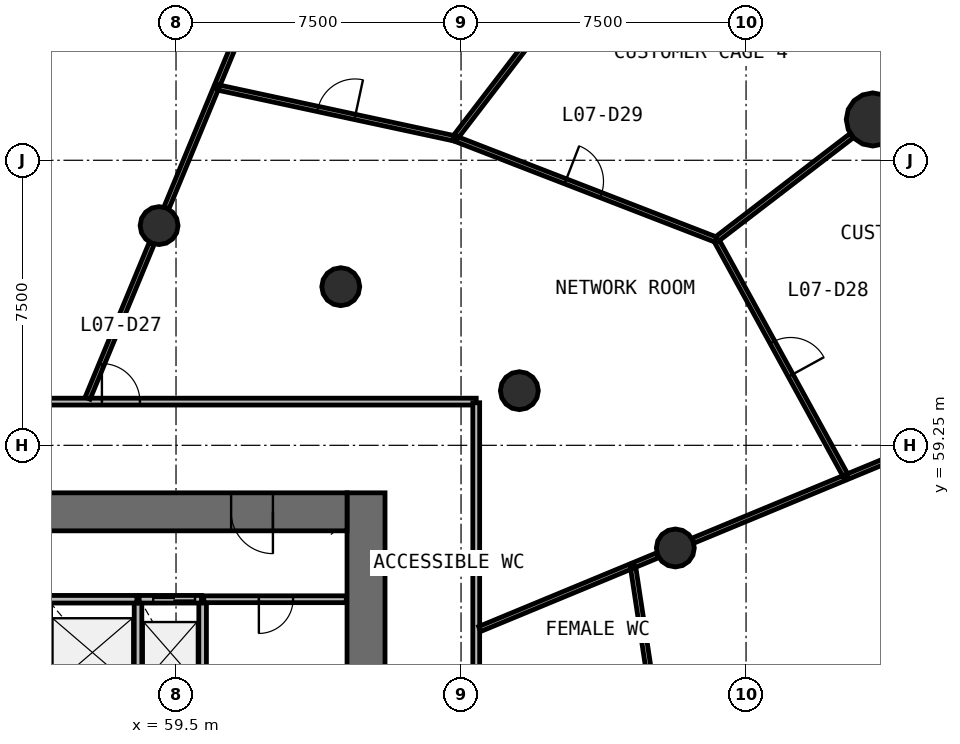
"""IFC4 building model, lengths in metres.
Left out: names, types, materials, properties, quantities, classifications, styles, units other than length and angle.
Written with IfcOpenShell. Run it as: python <this file> out.ifc"""

import sys

from ifc_helpers import new_model, si_unit, direction, frame, frame_2d, origin, origin_2d, place, context, subcontext, project, spatial, rectangle, circle, extrude, source, transform, mapped, element, fill, save


model = new_model("IFC4")
c1 = context("Model", 3, precision=1e-05, world=origin(), true_north=direction((0.0, 1.0)))
c2 = subcontext(c1, "Body", "Model", "MODEL_VIEW")
j1 = project(units=[si_unit("LENGTHUNIT", "METRE"), si_unit("PLANEANGLEUNIT", "RADIAN")], contexts=[c1])
p1 = place(None, origin())
s1 = spatial("IfcSite", under=j1, at=p1, CompositionType="ELEMENT")
p2 = place(p1, origin())
s2 = spatial("IfcBuilding", under=s1, at=p2, CompositionType="ELEMENT")
p3 = place(p2, frame((0.0, 0.0, 31.4)))
s3 = spatial("IfcBuildingStorey", under=s2, at=p3, CompositionType="ELEMENT", Elevation=31.4)
p4 = place(p3, frame((64.5, 38.0, 0.0), z_axis=(0.0, 0.0, 1.0), x_axis=(0.0, 1.0, 0.0)))
e1 = element("IfcWall", 1, at=p4, inside=s3, PredefinedType="SHEAR", context=c2, shape_type="SweptSolid", body=[
    extrude(rectangle(XDim=20.0, YDim=1.0, at=frame_2d((10.0, 0.0))), origin(), (0.0, 0.0, 1.0), 4.4),
])
p5 = place(p4, frame((9.1, 0.0, 0.0)))
e2 = element("IfcOpeningElement", 2, at=p5, cuts=e1, PredefinedType="OPENING", context=c2, shape_type="SweptSolid", body=[
    extrude(rectangle(XDim=1.8, YDim=2.1, at=frame_2d((0.9, 1.05))), frame((0.0, 0.51, 0.0), z_axis=(0.0, -1.0, 0.0), x_axis=(1.0, 0.0, 0.0)), (0.0, 0.0, 1.0), 1.02),
])
p6 = place(p3, frame((64.0, 57.5, 0.0), z_axis=(0.0, 0.0, 1.0), x_axis=(-1.0, 0.0, 0.0)))
e3 = element("IfcWall", 3, at=p6, inside=s3, PredefinedType="SHEAR", context=c2, shape_type="SweptSolid", body=[
    extrude(rectangle(XDim=24.0, YDim=1.0, at=frame_2d((12.0, 0.0))), origin(), (0.0, 0.0, 1.0), 4.4),
])
p7 = place(p6, frame((21.45, 0.0, 0.0)))
e4 = element("IfcOpeningElement", 4, at=p7, cuts=e3, PredefinedType="OPENING", context=c2, shape_type="SweptSolid", body=[
    extrude(rectangle(XDim=1.1, YDim=2.1, at=frame_2d((0.55, 1.05))), frame((0.0, 0.51, 0.0), z_axis=(0.0, -1.0, 0.0), x_axis=(1.0, 0.0, 0.0)), (0.0, 0.0, 1.0), 1.02),
])
p8 = place(p6, frame((1.95, 0.0, 0.0)))
e5 = element("IfcOpeningElement", 5, at=p8, cuts=e3, PredefinedType="OPENING", context=c2, shape_type="SweptSolid", body=[
    extrude(rectangle(XDim=1.1, YDim=2.1, at=frame_2d((0.55, 1.05))), frame((0.0, 0.51, 0.0), z_axis=(0.0, -1.0, 0.0), x_axis=(1.0, 0.0, 0.0)), (0.0, 0.0, 1.0), 1.02),
])
m1 = source(origin(), c2, "Body", "SweptSolid", [
    extrude(circle(Radius=0.7, at=origin_2d()), origin(), (0.0, 0.0, 1.0), 4.4),
])
p9 = place(p3, frame((77.836, 67.824, 0.0), z_axis=(0.0, 0.0, 1.0), x_axis=(1.0, 0.0, 0.0)))
e6 = element("IfcColumn", 6, at=p9, inside=s3, PredefinedType="COLUMN", context=c2, shape_type="MappedRepresentation", body=[
    mapped(m1, transform((0.0, 0.0, 0.0), scale=1.0)),
])
m2 = source(origin(), c2, "Body", "SweptSolid", [
    extrude(circle(Radius=0.5, at=origin_2d()), origin(), (0.0, 0.0, 1.0), 4.4),
])
for number, where, z_axis, x_axis in (
    (7, (72.639, 56.549, 0.0), (0.0, 0.0, 1.0), (1.0, 0.0, 0.0)),
    (8, (68.535, 60.688, 0.0), (0.0, 0.0, 1.0), (1.0, 0.0, 0.0)),
    (9, (63.835, 63.424, 0.0), (0.0, 0.0, 1.0), (1.0, 0.0, 0.0)),
    (10, (59.055, 65.031, 0.0), (0.0, 0.0, 1.0), (1.0, 0.0, 0.0)),
):
    element("IfcColumn", number, at=place(p3, frame(where, z_axis=z_axis, x_axis=x_axis)), inside=s3, PredefinedType="COLUMN", context=c2, shape_type="MappedRepresentation", body=[
        mapped(m2, transform((0.0, 0.0, 0.0), scale=1.0)),
    ])
for number, where, z_axis, x_axis in (
    (11, (58.5, 52.4, 0.0), (0.0, 0.0, 1.0), (0.0, 1.0, 0.0)),
    (12, (60.2, 52.4, 0.0), (0.0, 0.0, 1.0), (0.0, 1.0, 0.0)),
):
    element("IfcWall", number, at=place(p3, frame(where, z_axis=z_axis, x_axis=x_axis)), inside=s3, PredefinedType="SOLIDWALL", context=c2, shape_type="SweptSolid", body=[
        extrude(rectangle(XDim=2.8, YDim=0.2, at=frame_2d((1.4, 0.0))), origin(), (0.0, 0.0, 1.0), 3.95),
    ])
p10 = place(p3, frame((58.47, 55.2, 0.0), z_axis=(0.0, 0.0, 1.0), x_axis=(-1.0, 0.0, 0.0)))
e13 = element("IfcWall", 13, at=p10, inside=s3, PredefinedType="SOLIDWALL", context=c2, shape_type="SweptSolid", body=[
    extrude(rectangle(XDim=2.34, YDim=0.2, at=frame_2d((1.17, 0.0))), origin(), (0.0, 0.0, 1.0), 3.95),
])
p11 = place(p3, frame((60.17, 55.2, 0.0), z_axis=(0.0, 0.0, 1.0), x_axis=(-1.0, 0.0, 0.0)))
e14 = element("IfcWall", 14, at=p11, inside=s3, PredefinedType="SOLIDWALL", context=c2, shape_type="SweptSolid", body=[
    extrude(rectangle(XDim=1.64, YDim=0.2, at=frame_2d((0.82, 0.0))), origin(), (0.0, 0.0, 1.0), 3.95),
])
p12 = place(p11, frame((0.17, 0.0, 0.0)))
e15 = element("IfcOpeningElement", 15, at=p12, cuts=e14, PredefinedType="OPENING", context=c2, shape_type="SweptSolid", body=[
    extrude(rectangle(XDim=1.1, YDim=2.1, at=frame_2d((0.55, 1.05))), frame((0.0, 0.11, 0.0), z_axis=(0.0, -1.0, 0.0), x_axis=(1.0, 0.0, 0.0)), (0.0, 0.0, 1.0), 0.22),
])
p13 = place(p3, frame((36.6, 60.4, 0.0), z_axis=(0.0, 0.0, 1.0), x_axis=(1.0, 0.0, 0.0)))
e16 = element("IfcWall", 16, at=p13, inside=s3, PredefinedType="PARTITIONING", context=c2, shape_type="SweptSolid", body=[
    extrude(rectangle(XDim=30.8, YDim=0.18, at=frame_2d((15.4, 0.0))), origin(), (0.0, 0.0, 1.0), 3.05),
])
p14 = place(p13, frame((20.95, 0.0, 0.0)))
e17 = element("IfcOpeningElement", 17, at=p14, cuts=e16, PredefinedType="OPENING", context=c2, shape_type="SweptSolid", body=[
    extrude(rectangle(XDim=1.0, YDim=2.1, at=frame_2d((0.5, 1.05))), frame((0.0, 0.1, 0.0), z_axis=(0.0, -1.0, 0.0), x_axis=(1.0, 0.0, 0.0)), (0.0, 0.0, 1.0), 0.2),
])
p15 = place(p13, frame((14.95, 0.0, 0.0)))
e18 = element("IfcOpeningElement", 18, at=p15, cuts=e16, PredefinedType="OPENING", context=c2, shape_type="SweptSolid", body=[
    extrude(rectangle(XDim=1.0, YDim=2.1, at=frame_2d((0.5, 1.05))), frame((0.0, 0.1, 0.0), z_axis=(0.0, -1.0, 0.0), x_axis=(1.0, 0.0, 0.0)), (0.0, 0.0, 1.0), 0.2),
])
p16 = place(p3, frame((67.4, 60.37, 0.0), z_axis=(0.0, 0.0, 1.0), x_axis=(0.0, -1.0, 0.0)))
e19 = element("IfcWall", 19, at=p16, inside=s3, PredefinedType="PARTITIONING", context=c2, shape_type="SweptSolid", body=[
    extrude(rectangle(XDim=23.583, YDim=0.18, at=frame_2d((11.791, 0.0))), origin(), (0.0, 0.0, 1.0), 3.05),
])
p17 = place(p16, frame((11.833, 0.0, 0.0)))
e20 = element("IfcOpeningElement", 20, at=p17, cuts=e19, PredefinedType="OPENING", context=c2, shape_type="SweptSolid", body=[
    extrude(rectangle(XDim=0.9, YDim=2.1, at=frame_2d((0.45, 1.05))), frame((0.0, 0.1, 0.0), z_axis=(0.0, -1.0, 0.0), x_axis=(1.0, 0.0, 0.0)), (0.0, 0.0, 1.0), 0.2),
])
p18 = place(p16, frame((10.433, 0.0, 0.0)))
e21 = element("IfcOpeningElement", 21, at=p18, cuts=e19, PredefinedType="OPENING", context=c2, shape_type="SweptSolid", body=[
    extrude(rectangle(XDim=0.9, YDim=2.1, at=frame_2d((0.45, 1.05))), frame((0.0, 0.1, 0.0), z_axis=(0.0, -1.0, 0.0), x_axis=(1.0, 0.0, 0.0)), (0.0, 0.0, 1.0), 0.2),
])
p19 = place(p16, frame((7.833, 0.0, 0.0)))
e22 = element("IfcOpeningElement", 22, at=p19, cuts=e19, PredefinedType="OPENING", context=c2, shape_type="SweptSolid", body=[
    extrude(rectangle(XDim=0.9, YDim=2.1, at=frame_2d((0.45, 1.05))), frame((0.0, 0.1, 0.0), z_axis=(0.0, -1.0, 0.0), x_axis=(1.0, 0.0, 0.0)), (0.0, 0.0, 1.0), 0.2),
])
p20 = place(p16, frame((14.732, 0.0, 0.0)))
e23 = element("IfcOpeningElement", 23, at=p20, cuts=e19, PredefinedType="OPENING", context=c2, shape_type="SweptSolid", body=[
    extrude(rectangle(XDim=1.0, YDim=2.1, at=frame_2d((0.5, 1.05))), frame((0.0, 0.1, 0.0), z_axis=(0.0, -1.0, 0.0), x_axis=(1.0, 0.0, 0.0)), (0.0, 0.0, 1.0), 0.2),
])
p21 = place(p3, frame((63.98, 55.2, 0.0), z_axis=(0.0, 0.0, 1.0), x_axis=(-1.0, 0.0, 0.0)))
e24 = element("IfcWall", 24, at=p21, inside=s3, PredefinedType="PARTITIONING", context=c2, shape_type="SweptSolid", body=[
    extrude(rectangle(XDim=3.75, YDim=0.18, at=frame_2d((1.875, 0.0))), origin(), (0.0, 0.0, 1.0), 3.95),
])
p22 = place(p21, frame((1.4, 0.0, 0.0)))
e25 = element("IfcOpeningElement", 25, at=p22, cuts=e24, PredefinedType="OPENING", context=c2, shape_type="SweptSolid", body=[
    extrude(rectangle(XDim=0.9, YDim=2.1, at=frame_2d((0.45, 1.05))), frame((0.0, 0.1, 0.0), z_axis=(0.0, -1.0, 0.0), x_axis=(1.0, 0.0, 0.0)), (0.0, 0.0, 1.0), 0.2),
])
p23 = place(p3, frame((66.829, 67.326, 0.0), z_axis=(0.0, 0.0, 1.0), x_axis=(0.932497314738, -0.361176906801, 0.0)))
e26 = element("IfcWall", 26, at=p23, inside=s3, PredefinedType="PARTITIONING", context=c2, shape_type="SweptSolid", body=[
    extrude(rectangle(XDim=7.381, YDim=0.14, at=frame_2d((3.69, 0.0))), origin(), (0.0, 0.0, 1.0), 3.05),
])
p24 = place(p23, frame((3.131, 0.0, 0.0)))
e27 = element("IfcOpeningElement", 27, at=p24, cuts=e26, PredefinedType="OPENING", context=c2, shape_type="SweptSolid", body=[
    extrude(rectangle(XDim=1.0, YDim=2.1, at=frame_2d((0.5, 1.05))), frame((0.0, 0.08, 0.0), z_axis=(0.0, -1.0, 0.0), x_axis=(1.0, 0.0, 0.0)), (0.0, 0.0, 1.0), 0.16),
])
p25 = place(p3, frame((73.726, 64.634, 0.0), z_axis=(0.0, 0.0, 1.0), x_axis=(0.481181569965, -0.876620953848, 0.0)))
e28 = element("IfcWall", 28, at=p25, inside=s3, PredefinedType="PARTITIONING", context=c2, shape_type="SweptSolid", body=[
    extrude(rectangle(XDim=7.096, YDim=0.14, at=frame_2d((3.548, 0.0))), origin(), (0.0, 0.0, 1.0), 3.05),
])
p26 = place(p25, frame((3.046, 0.0, 0.0)))
e29 = element("IfcOpeningElement", 29, at=p26, cuts=e28, PredefinedType="OPENING", context=c2, shape_type="SweptSolid", body=[
    extrude(rectangle(XDim=1.0, YDim=2.1, at=frame_2d((0.5, 1.05))), frame((0.0, 0.08, 0.0), z_axis=(0.0, -1.0, 0.0), x_axis=(1.0, 0.0, 0.0)), (0.0, 0.0, 1.0), 0.16),
])
p27 = place(p3, frame((77.168, 58.425, 0.0), z_axis=(0.0, 0.0, 1.0), x_axis=(0.923883429162, 0.382674024883, 0.0)))
e30 = element("IfcWall", 30, at=p27, inside=s3, PredefinedType="PARTITIONING", context=c2, shape_type="SweptSolid", body=[
    extrude(rectangle(XDim=6.959, YDim=0.14, at=frame_2d((3.479, 0.0))), origin(), (0.0, 0.0, 1.0), 3.05),
])
p28 = place(p3, frame((60.563, 68.674, 0.0), z_axis=(0.0, 0.0, 1.0), x_axis=(0.977621151311, -0.210373202926, 0.0)))
e31 = element("IfcWall", 31, at=p28, inside=s3, PredefinedType="PARTITIONING", context=c2, shape_type="SweptSolid", body=[
    extrude(rectangle(XDim=6.379, YDim=0.14, at=frame_2d((3.19, 0.0))), origin(), (0.0, 0.0, 1.0), 3.05),
])
p29 = place(p28, frame((2.729, 0.0, 0.0)))
e32 = element("IfcOpeningElement", 32, at=p29, cuts=e31, PredefinedType="OPENING", context=c2, shape_type="SweptSolid", body=[
    extrude(rectangle(XDim=1.0, YDim=2.1, at=frame_2d((0.5, 1.05))), frame((0.0, 0.08, 0.0), z_axis=(0.0, -1.0, 0.0), x_axis=(1.0, 0.0, 0.0)), (0.0, 0.0, 1.0), 0.16),
])
p30 = place(p3, frame((60.591, 68.74, 0.0), z_axis=(0.0, 0.0, 1.0), x_axis=(0.382657084758, 0.923890445607, 0.0)))
e33 = element("IfcWall", 33, at=p30, inside=s3, PredefinedType="PARTITIONING", context=c2, shape_type="SweptSolid", body=[
    extrude(rectangle(XDim=5.65, YDim=0.14, at=frame_2d((2.825, 0.0))), origin(), (0.0, 0.0, 1.0), 3.05),
])
p31 = place(p3, frame((72.341, 50.678, 0.0), z_axis=(0.0, 0.0, 1.0), x_axis=(-0.149839757117, 0.988710294873, 0.0)))
e34 = element("IfcWall", 34, at=p31, inside=s3, PredefinedType="PARTITIONING", context=c2, shape_type="SweptSolid", body=[
    extrude(rectangle(XDim=5.47, YDim=0.14, at=frame_2d((2.735, 0.0))), origin(), (0.0, 0.0, 1.0), 3.05),
])
p32 = place(p3, frame((66.874, 67.384, 0.0), z_axis=(0.0, 0.0, 1.0), x_axis=(0.608760140139, 0.793354329274, 0.0)))
e35 = element("IfcWall", 35, at=p32, inside=s3, PredefinedType="PARTITIONING", context=c2, shape_type="SweptSolid", body=[
    extrude(rectangle(XDim=5.24, YDim=0.14, at=frame_2d((2.62, 0.0))), origin(), (0.0, 0.0, 1.0), 3.05),
])
p33 = place(p3, frame((57.174, 60.49, 0.0), z_axis=(0.0, 0.0, 1.0), x_axis=(0.382672831764, 0.923883923353, 0.0)))
e36 = element("IfcWall", 36, at=p33, inside=s3, PredefinedType="PARTITIONING", context=c2, shape_type="SweptSolid", body=[
    extrude(rectangle(XDim=4.41, YDim=0.14, at=frame_2d((2.205, 0.0))), origin(), (0.0, 0.0, 1.0), 3.05),
])
p34 = place(p3, frame((73.736, 64.678, 0.0), z_axis=(0.0, 0.0, 1.0), x_axis=(0.793381815568, 0.608724317508, 0.0)))
e37 = element("IfcWall", 37, at=p34, inside=s3, PredefinedType="PARTITIONING", context=c2, shape_type="SweptSolid", body=[
    extrude(rectangle(XDim=4.463, YDim=0.14, at=frame_2d((2.232, 0.0))), origin(), (0.0, 0.0, 1.0), 3.05),
])
p35 = place(p3, frame((67.49, 54.416, 0.0), z_axis=(0.0, 0.0, 1.0), x_axis=(0.923879529007, 0.382683440824, 0.0)))
e38 = element("IfcWall", 38, at=p35, inside=s3, PredefinedType="PARTITIONING", context=c2, shape_type="SweptSolid", body=[
    extrude(rectangle(XDim=4.291, YDim=0.14, at=frame_2d((2.146, 0.0))), origin(), (0.0, 0.0, 1.0), 3.05),
])
p36 = place(p3, frame((73.106, 56.742, 0.0), z_axis=(0.0, 0.0, 1.0), x_axis=(0.9238617037, 0.382726472086, 0.0)))
e39 = element("IfcWall", 39, at=p36, inside=s3, PredefinedType="PARTITIONING", context=c2, shape_type="SweptSolid", body=[
    extrude(rectangle(XDim=4.297, YDim=0.14, at=frame_2d((2.148, 0.0))), origin(), (0.0, 0.0, 1.0), 3.05),
])
p37 = place(p3, frame((59.248, 65.498, 0.0), z_axis=(0.0, 0.0, 1.0), x_axis=(0.382676564955, 0.923882377056, 0.0)))
e40 = element("IfcWall", 40, at=p37, inside=s3, PredefinedType="PARTITIONING", context=c2, shape_type="SweptSolid", body=[
    extrude(rectangle(XDim=3.408, YDim=0.14, at=frame_2d((1.704, 0.0))), origin(), (0.0, 0.0, 1.0), 3.05),
])
p38 = place(p3, frame((71.549, 56.097, 0.0), z_axis=(0.0, 0.0, 1.0), x_axis=(0.923972786695, 0.382458219219, 0.0)))
e41 = element("IfcWall", 41, at=p38, inside=s3, PredefinedType="PARTITIONING", context=c2, shape_type="SweptSolid", body=[
    extrude(rectangle(XDim=0.675, YDim=0.14, at=frame_2d((0.338, 0.0))), origin(), (0.0, 0.0, 1.0), 3.05),
])
m3 = source(origin(), c2, "Body", "SweptSolid", [
    extrude(rectangle(XDim=1.1, YDim=2.1, at=frame_2d((0.55, 1.05))), frame((0.0, 0.025, 0.0), z_axis=(0.0, -1.0, 0.0), x_axis=(1.0, 0.0, 0.0)), (0.0, 0.0, 1.0), 0.05),
])
p39 = place(p12, origin())
e42 = element("IfcDoor", 42, at=p39, inside=s3, OperationType="DOUBLE_DOOR_SLIDING", PredefinedType="USERDEFINED", context=c2, shape_type="MappedRepresentation", body=[
    mapped(m3, transform((0.0, 0.0, 0.0), scale=1.0)),
])
fill(e15, e42)
m4 = source(origin(), c2, "Body", "SweptSolid", [
    extrude(rectangle(XDim=1.1, YDim=2.1, at=frame_2d((0.55, 1.05))), frame((0.0, 0.025, 0.0), z_axis=(0.0, -1.0, 0.0), x_axis=(1.0, 0.0, 0.0)), (0.0, 0.0, 1.0), 0.05),
])
p40 = place(p8, origin())
e43 = element("IfcDoor", 43, at=p40, inside=s3, OperationType="SINGLE_SWING_LEFT", PredefinedType="DOOR", context=c2, shape_type="MappedRepresentation", body=[
    mapped(m4, transform((0.0, 0.0, 0.0), scale=1.0)),
])
fill(e5, e43)
m5 = source(origin(), c2, "Body", "SweptSolid", [
    extrude(rectangle(XDim=1.0, YDim=2.1, at=frame_2d((0.5, 1.05))), frame((0.0, 0.025, 0.0), z_axis=(0.0, -1.0, 0.0), x_axis=(1.0, 0.0, 0.0)), (0.0, 0.0, 1.0), 0.05),
])
p41 = place(p14, origin())
e44 = element("IfcDoor", 44, at=p41, inside=s3, OperationType="SINGLE_SWING_LEFT", PredefinedType="DOOR", context=c2, shape_type="MappedRepresentation", body=[
    mapped(m5, transform((0.0, 0.0, 0.0), scale=1.0)),
])
fill(e17, e44)
p42 = place(p26, origin())
e45 = element("IfcDoor", 45, at=p42, inside=s3, OperationType="SINGLE_SWING_RIGHT", PredefinedType="DOOR", context=c2, shape_type="MappedRepresentation", body=[
    mapped(m5, transform((0.0, 0.0, 0.0), scale=1.0)),
])
fill(e29, e45)
p43 = place(p24, origin())
e46 = element("IfcDoor", 46, at=p43, inside=s3, OperationType="SINGLE_SWING_LEFT", PredefinedType="DOOR", context=c2, shape_type="MappedRepresentation", body=[
    mapped(m5, transform((0.0, 0.0, 0.0), scale=1.0)),
])
fill(e27, e46)
p44 = place(p29, origin())
e47 = element("IfcDoor", 47, at=p44, inside=s3, OperationType="SINGLE_SWING_RIGHT", PredefinedType="DOOR", context=c2, shape_type="MappedRepresentation", body=[
    mapped(m5, transform((0.0, 0.0, 0.0), scale=1.0)),
])
fill(e32, e47)
m6 = source(origin(), c2, "Body", "SweptSolid", [
    extrude(rectangle(XDim=0.9, YDim=2.1, at=frame_2d((0.45, 1.05))), frame((0.0, 0.025, 0.0), z_axis=(0.0, -1.0, 0.0), x_axis=(1.0, 0.0, 0.0)), (0.0, 0.0, 1.0), 0.05),
])
p45 = place(p22, origin())
e48 = element("IfcDoor", 48, at=p45, inside=s3, OperationType="SINGLE_SWING_RIGHT", PredefinedType="DOOR", context=c2, shape_type="MappedRepresentation", body=[
    mapped(m6, transform((0.0, 0.0, 0.0), scale=1.0)),
])
fill(e25, e48)
save(model, sys.argv[1])
